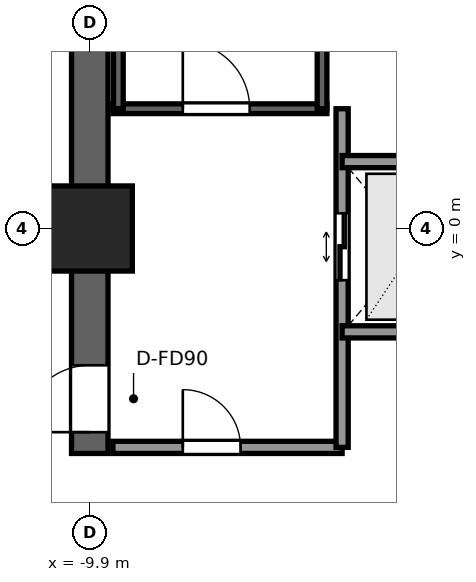
"""IFC4 building model, lengths in metres.
Left out: names, types, materials, properties, quantities, classifications, styles, units other than length and angle.
Written with IfcOpenShell. Run it as: python <this file> out.ifc"""

import sys

from ifc_helpers import new_model, si_unit, direction, frame, frame_2d, origin, origin_2d, place, context, subcontext, project, spatial, rectangle, extrude, element, fill, save


model = new_model("IFC4")
c1 = context("Model", 3, precision=1e-05, world=origin(), true_north=direction((0.0, 1.0)))
c2 = subcontext(c1, "Body", "Model", "MODEL_VIEW")
j1 = project(units=[si_unit("LENGTHUNIT", "METRE"), si_unit("PLANEANGLEUNIT", "RADIAN")], contexts=[c1])
p1 = place(None, origin())
s1 = spatial("IfcSite", under=j1, at=p1, CompositionType="ELEMENT")
p2 = place(p1, origin())
s2 = spatial("IfcBuilding", under=s1, at=p2, CompositionType="ELEMENT")
p3 = place(p2, frame((0.0, 0.0, 23.8)))
s3 = spatial("IfcBuildingStorey", under=s2, at=p3, CompositionType="ELEMENT", Elevation=23.8)
p4 = place(p3, frame((-9.9, -3.7, 0.0), z_axis=(0.0, 0.0, 1.0), x_axis=(0.0, 1.0, 0.0)))
e1 = element("IfcWall", 1, at=p4, inside=s3, PredefinedType="SHEAR", context=c2, shape_type="SweptSolid", body=[
    extrude(rectangle(XDim=13.3, YDim=0.6, at=frame_2d((6.65, 0.0))), origin(), (0.0, 0.0, 1.0), 3.3),
])
p5 = place(p4, frame((0.35, 0.0, 0.0)))
e2 = element("IfcOpeningElement", 2, at=p5, cuts=e1, PredefinedType="OPENING", context=c2, shape_type="SweptSolid", body=[
    extrude(rectangle(XDim=1.1, YDim=2.2, at=frame_2d((0.55, 1.1))), frame((0.0, 0.31, 0.0), z_axis=(0.0, -1.0, 0.0), x_axis=(1.0, 0.0, 0.0)), (0.0, 0.0, 1.0), 0.62),
])
p6 = place(p3, frame((-9.9, 0.0, 0.0), z_axis=(0.0, 0.0, 1.0), x_axis=(1.0, 0.0, 0.0)))
e3 = element("IfcColumn", 3, at=p6, inside=s3, PredefinedType="COLUMN", context=c2, shape_type="SweptSolid", body=[
    extrude(rectangle(XDim=1.4, YDim=1.4, at=origin_2d()), origin(), (0.0, 0.0, 1.0), 3.3),
])
p7 = place(p3, frame((-9.52, 1.97, 0.0), z_axis=(0.0, 0.0, 1.0), x_axis=(1.0, 0.0, 0.0)))
e4 = element("IfcWall", 4, at=p7, inside=s3, PredefinedType="SHEAR", context=c2, shape_type="SweptSolid", body=[
    extrude(rectangle(XDim=3.52, YDim=0.16, at=frame_2d((1.76, 0.0))), origin(), (0.0, 0.0, 1.0), 3.3),
])
p8 = place(p7, frame((1.15, 0.0, 0.0)))
e5 = element("IfcOpeningElement", 5, at=p8, cuts=e4, PredefinedType="OPENING", context=c2, shape_type="SweptSolid", body=[
    extrude(rectangle(XDim=1.1, YDim=2.2, at=frame_2d((0.55, 1.1))), frame((0.0, 0.09, 0.0), z_axis=(0.0, -1.0, 0.0), x_axis=(1.0, 0.0, 0.0)), (0.0, 0.0, 1.0), 0.18),
])
for number, where, z_axis, x_axis in (
    (6, (-9.43, 1.97, 0.0), (0.0, 0.0, 1.0), (0.0, 1.0, 0.0)),
    (7, (-6.08, 1.97, 0.0), (0.0, 0.0, 1.0), (0.0, 1.0, 0.0)),
):
    element("IfcWall", number, at=place(p3, frame(where, z_axis=z_axis, x_axis=x_axis)), inside=s3, PredefinedType="SHEAR", context=c2, shape_type="SweptSolid", body=[
        extrude(rectangle(XDim=7.56, YDim=0.16, at=frame_2d((3.78, 0.0))), origin(), (0.0, 0.0, 1.0), 3.3),
    ])
p9 = place(p3, frame((-9.52, -3.6, 0.0), z_axis=(0.0, 0.0, 1.0), x_axis=(1.0, 0.0, 0.0)))
e8 = element("IfcWall", 8, at=p9, inside=s3, PredefinedType="SOLIDWALL", context=c2, shape_type="SweptSolid", body=[
    extrude(rectangle(XDim=3.77, YDim=0.2, at=frame_2d((1.885, 0.0))), origin(), (0.0, 0.0, 1.0), 3.06),
])
p10 = place(p9, frame((1.15, 0.0, 0.0)))
e9 = element("IfcOpeningElement", 9, at=p10, cuts=e8, PredefinedType="OPENING", context=c2, shape_type="SweptSolid", body=[
    extrude(rectangle(XDim=0.95, YDim=2.06, at=frame_2d((0.475, 1.03))), frame((0.0, 0.11, 0.0), z_axis=(0.0, -1.0, 0.0), x_axis=(1.0, 0.0, 0.0)), (0.0, 0.0, 1.0), 0.22),
])
p11 = place(p3, frame((-5.75, -3.6, 0.0), z_axis=(0.0, 0.0, 1.0), x_axis=(0.0, 1.0, 0.0)))
e10 = element("IfcWall", 10, at=p11, inside=s3, PredefinedType="SOLIDWALL", context=c2, shape_type="SweptSolid", body=[
    extrude(rectangle(XDim=5.57, YDim=0.2, at=frame_2d((2.785, 0.0))), origin(), (0.0, 0.0, 1.0), 3.06),
])
p12 = place(p11, frame((2.75, 0.0, 0.0)))
e11 = element("IfcOpeningElement", 11, at=p12, cuts=e10, PredefinedType="OPENING", context=c2, shape_type="SweptSolid", body=[
    extrude(rectangle(XDim=1.1, YDim=2.2, at=frame_2d((0.55, 1.1))), frame((0.0, 0.11, 0.0), z_axis=(0.0, -1.0, 0.0), x_axis=(1.0, 0.0, 0.0)), (0.0, 0.0, 1.0), 0.22),
])
for number, where, z_axis, x_axis in (
    (12, (-5.75, -1.7, 0.0), (0.0, 0.0, 1.0), (1.0, 0.0, 0.0)),
    (13, (-5.75, 1.1, 0.0), (0.0, 0.0, 1.0), (1.0, 0.0, 0.0)),
):
    element("IfcWall", number, at=place(p3, frame(where, z_axis=z_axis, x_axis=x_axis)), inside=s3, PredefinedType="SOLIDWALL", context=c2, shape_type="SweptSolid", body=[
        extrude(rectangle(XDim=2.4, YDim=0.2, at=frame_2d((1.2, 0.0))), origin(), (0.0, 0.0, 1.0), 3.06),
    ])
p13 = place(p8, origin())
e14 = element("IfcDoor", 14, at=p13, inside=s3, OperationType="SINGLE_SWING_LEFT", PredefinedType="DOOR", context=c2, shape_type="SweptSolid", body=[
    extrude(rectangle(XDim=1.1, YDim=2.2, at=frame_2d((0.55, 1.1))), frame((0.0, 0.025, 0.0), z_axis=(0.0, -1.0, 0.0), x_axis=(1.0, 0.0, 0.0)), (0.0, 0.0, 1.0), 0.05),
])
fill(e5, e14)
p14 = place(p5, origin())
e15 = element("IfcDoor", 15, at=p14, inside=s3, OperationType="SINGLE_SWING_LEFT", PredefinedType="DOOR", context=c2, shape_type="SweptSolid", body=[
    extrude(rectangle(XDim=1.1, YDim=2.2, at=frame_2d((0.55, 1.1))), frame((0.0, 0.025, 0.0), z_axis=(0.0, -1.0, 0.0), x_axis=(1.0, 0.0, 0.0)), (0.0, 0.0, 1.0), 0.05),
])
fill(e2, e15)
p15 = place(p12, origin())
e16 = element("IfcDoor", 16, at=p15, inside=s3, OperationType="DOUBLE_DOOR_SLIDING", PredefinedType="DOOR", context=c2, shape_type="SweptSolid", body=[
    extrude(rectangle(XDim=1.1, YDim=2.2, at=frame_2d((0.55, 1.1))), frame((0.0, 0.025, 0.0), z_axis=(0.0, -1.0, 0.0), x_axis=(1.0, 0.0, 0.0)), (0.0, 0.0, 1.0), 0.05),
])
fill(e11, e16)
p16 = place(p10, origin())
e17 = element("IfcDoor", 17, at=p16, inside=s3, OperationType="SINGLE_SWING_LEFT", PredefinedType="DOOR", context=c2, shape_type="SweptSolid", body=[
    extrude(rectangle(XDim=0.95, YDim=2.06, at=frame_2d((0.475, 1.03))), frame((0.0, 0.025, 0.0), z_axis=(0.0, -1.0, 0.0), x_axis=(1.0, 0.0, 0.0)), (0.0, 0.0, 1.0), 0.05),
])
fill(e9, e17)
save(model, sys.argv[1])
